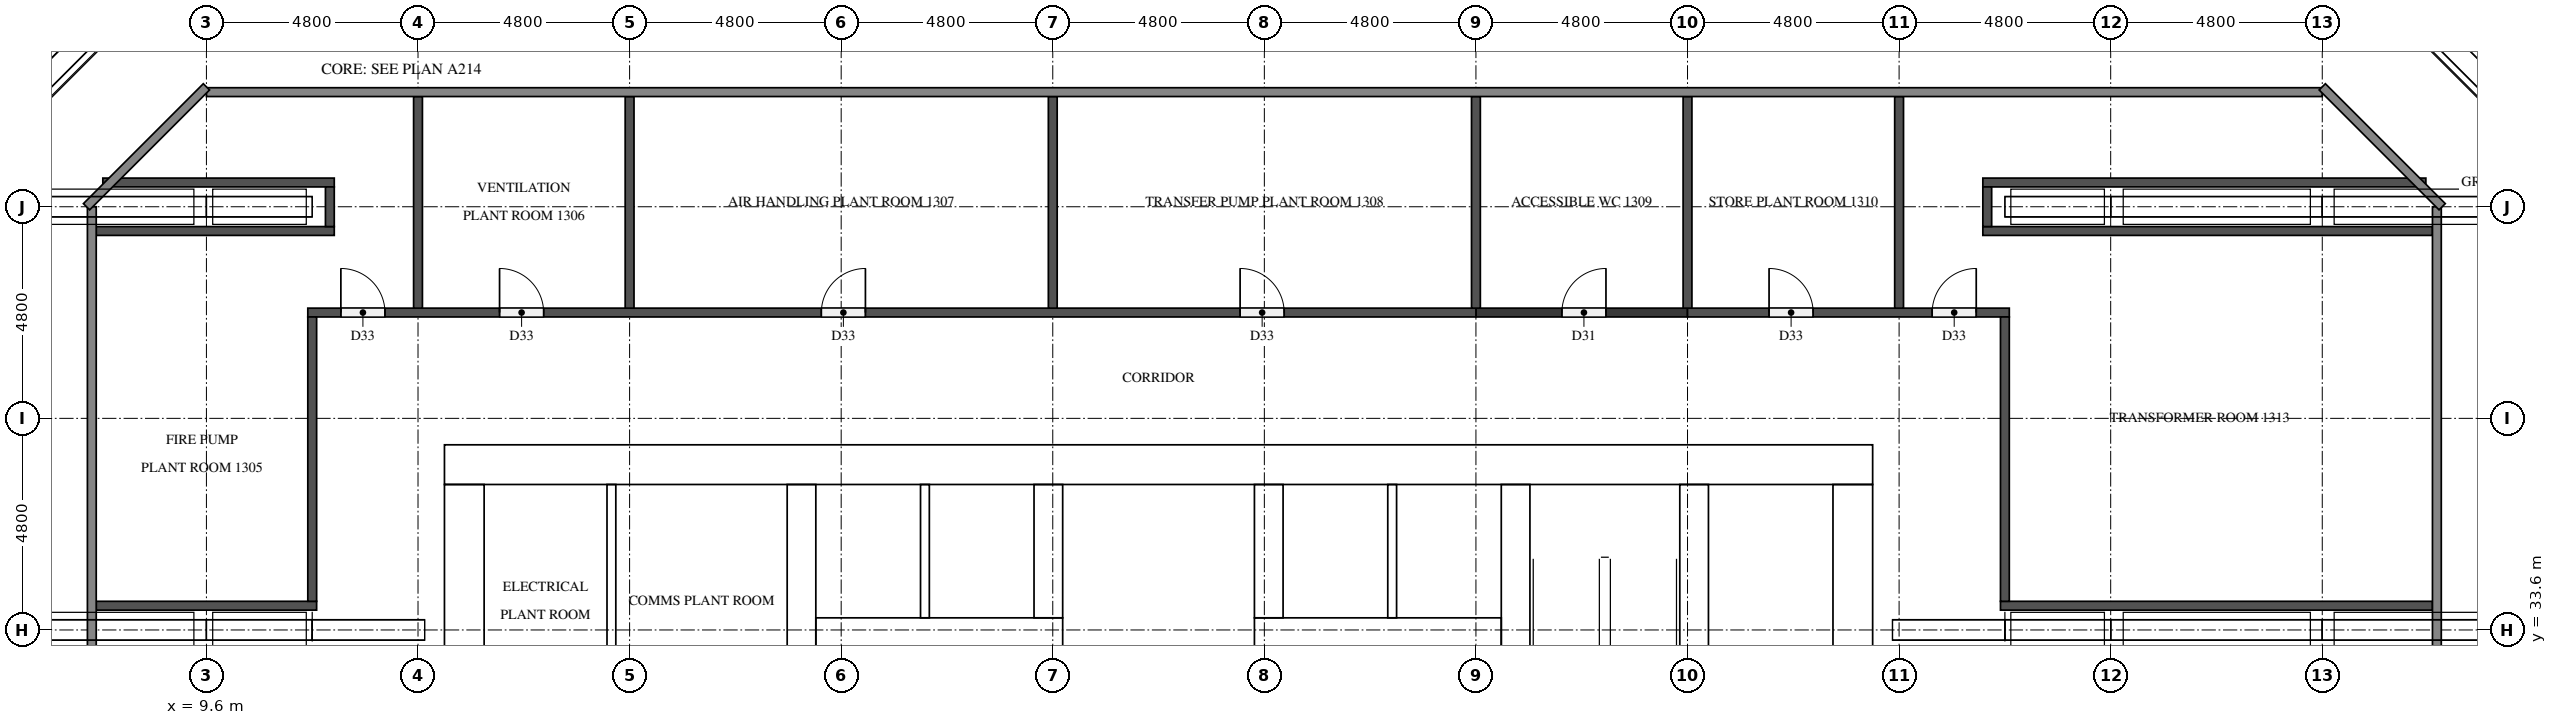
"""IFC4 building model, lengths in metres.
Left out: names, types, materials, properties, quantities, classifications, styles, units other than length and angle.
Written with IfcOpenShell. Run it as: python <this file> out.ifc"""

import sys

from ifc_helpers import new_model, si_unit, direction, frame, frame_2d, origin, place, context, subcontext, project, spatial, rectangle, extrude, element, fill, save


model = new_model("IFC4")
c1 = context("Model", 3, precision=1e-05, world=origin(), true_north=direction((0.0, 1.0)))
c2 = subcontext(c1, "Body", "Model", "MODEL_VIEW")
j1 = project(units=[si_unit("LENGTHUNIT", "METRE"), si_unit("PLANEANGLEUNIT", "RADIAN")], contexts=[c1])
p1 = place(None, origin())
s1 = spatial("IfcSite", under=j1, at=p1, CompositionType="ELEMENT")
p2 = place(p1, origin())
s2 = spatial("IfcBuilding", under=s1, at=p2, CompositionType="ELEMENT")
p3 = place(p2, frame((0.0, 0.0, 53.9)))
s3 = spatial("IfcBuildingStorey", under=s2, at=p3, CompositionType="ELEMENT", Elevation=53.9)
p4 = place(p3, frame((15.0, 37.35, 0.0), z_axis=(0.0, 0.0, 1.0), x_axis=(1.0, 0.0, 0.0)))
e1 = element("IfcWall", 1, at=p4, inside=s3, PredefinedType="SHEAR", context=c2, shape_type="SweptSolid", body=[
    extrude(rectangle(XDim=32.4, YDim=0.9, at=frame_2d((16.2, 0.0))), origin(), (0.0, 0.0, 1.0), 5.1),
])
p5 = place(p4, frame((15.3, 0.0, 0.0)))
e2 = element("IfcOpeningElement", 2, at=p5, cuts=e1, PredefinedType="OPENING", context=c2, shape_type="SweptSolid", body=[
    extrude(rectangle(XDim=1.8, YDim=2.1, at=frame_2d((0.9, 1.05))), frame((0.0, 0.46, 0.0), z_axis=(0.0, -1.0, 0.0), x_axis=(1.0, 0.0, 0.0)), (0.0, 0.0, 1.0), 0.92),
])
p6 = place(p4, frame((1.794, 0.0, 0.0)))
e3 = element("IfcOpeningElement", 3, at=p6, cuts=e1, PredefinedType="OPENING", context=c2, shape_type="SweptSolid", body=[
    extrude(rectangle(XDim=1.0, YDim=2.1, at=frame_2d((0.5, 1.05))), frame((0.0, 0.46, 0.0), z_axis=(0.0, -1.0, 0.0), x_axis=(1.0, 0.0, 0.0)), (0.0, 0.0, 1.0), 0.92),
])
p7 = place(p4, frame((5.331, 0.0, 0.0)))
e4 = element("IfcOpeningElement", 4, at=p7, cuts=e1, PredefinedType="OPENING", context=c2, shape_type="SweptSolid", body=[
    extrude(rectangle(XDim=1.0, YDim=2.1, at=frame_2d((0.5, 1.05))), frame((0.0, 0.46, 0.0), z_axis=(0.0, -1.0, 0.0), x_axis=(1.0, 0.0, 0.0)), (0.0, 0.0, 1.0), 0.92),
])
p8 = place(p3, frame((15.45, 15.9, 0.0), z_axis=(0.0, 0.0, 1.0), x_axis=(0.0, 1.0, 0.0)))
e5 = element("IfcWall", 5, at=p8, inside=s3, PredefinedType="SHEAR", context=c2, shape_type="SweptSolid", body=[
    extrude(rectangle(XDim=21.0, YDim=0.9, at=frame_2d((10.5, 0.0))), origin(), (0.0, 0.0, 1.0), 5.1),
])
p9 = place(p8, frame((4.86, 0.0, 0.0)))
e6 = element("IfcOpeningElement", 6, at=p9, cuts=e5, PredefinedType="OPENING", context=c2, shape_type="SweptSolid", body=[
    extrude(rectangle(XDim=1.2, YDim=2.1, at=frame_2d((0.6, 1.05))), frame((0.0, 0.46, 0.0), z_axis=(0.0, -1.0, 0.0), x_axis=(1.0, 0.0, 0.0)), (0.0, 0.0, 1.0), 0.92),
])
p10 = place(p3, frame((46.95, 15.9, 0.0), z_axis=(0.0, 0.0, 1.0), x_axis=(0.0, 1.0, 0.0)))
e7 = element("IfcWall", 7, at=p10, inside=s3, PredefinedType="SHEAR", context=c2, shape_type="SweptSolid", body=[
    extrude(rectangle(XDim=21.0, YDim=0.9, at=frame_2d((10.5, 0.0))), origin(), (0.0, 0.0, 1.0), 5.1),
])
p11 = place(p10, frame((10.2, 0.0, 0.0)))
e8 = element("IfcOpeningElement", 8, at=p11, cuts=e7, PredefinedType="OPENING", context=c2, shape_type="SweptSolid", body=[
    extrude(rectangle(XDim=1.2, YDim=2.1, at=frame_2d((0.6, 1.05))), frame((0.0, 0.46, 0.0), z_axis=(0.0, -1.0, 0.0), x_axis=(1.0, 0.0, 0.0)), (0.0, 0.0, 1.0), 0.92),
])
p12 = place(p3, frame((23.1, 15.9, 0.0), z_axis=(0.0, 0.0, 1.0), x_axis=(0.0, 1.0, 0.0)))
e9 = element("IfcWall", 9, at=p12, inside=s3, PredefinedType="SHEAR", context=c2, shape_type="SweptSolid", body=[
    extrude(rectangle(XDim=21.0, YDim=0.65, at=frame_2d((10.5, 0.0))), origin(), (0.0, 0.0, 1.0), 5.1),
])
p13 = place(p3, frame((39.3, 27.75, 0.0), z_axis=(0.0, 0.0, 1.0), x_axis=(0.0, 1.0, 0.0)))
e10 = element("IfcWall", 10, at=p13, inside=s3, PredefinedType="SHEAR", context=c2, shape_type="SweptSolid", body=[
    extrude(rectangle(XDim=9.15, YDim=0.65, at=frame_2d((4.575, 0.0))), origin(), (0.0, 0.0, 1.0), 5.1),
])
p14 = place(p3, frame((43.35, 27.75, 0.0), z_axis=(0.0, 0.0, 1.0), x_axis=(0.0, 1.0, 0.0)))
e11 = element("IfcWall", 11, at=p14, inside=s3, PredefinedType="SHEAR", context=c2, shape_type="SweptSolid", body=[
    extrude(rectangle(XDim=9.15, YDim=0.65, at=frame_2d((4.575, 0.0))), origin(), (0.0, 0.0, 1.0), 5.1),
])
p15 = place(p14, frame((7.65, 0.0, 0.0)))
e12 = element("IfcOpeningElement", 12, at=p15, cuts=e11, PredefinedType="OPENING", context=c2, shape_type="SweptSolid", body=[
    extrude(rectangle(XDim=1.2, YDim=2.1, at=frame_2d((0.6, 1.05))), frame((0.0, 0.335, 0.0), z_axis=(0.0, -1.0, 0.0), x_axis=(1.0, 0.0, 0.0)), (0.0, 0.0, 1.0), 0.67),
])
p16 = place(p3, frame((23.425, 33.55, 0.0), z_axis=(0.0, 0.0, 1.0), x_axis=(1.0, 0.0, 0.0)))
e13 = element("IfcWall", 13, at=p16, inside=s3, PredefinedType="SHEAR", context=c2, shape_type="SweptSolid", body=[
    extrude(rectangle(XDim=5.6, YDim=0.65, at=frame_2d((2.8, 0.0))), origin(), (0.0, 0.0, 1.0), 5.1),
])
p17 = place(p3, frame((33.375, 33.55, 0.0), z_axis=(0.0, 0.0, 1.0), x_axis=(1.0, 0.0, 0.0)))
e14 = element("IfcWall", 14, at=p17, inside=s3, PredefinedType="SHEAR", context=c2, shape_type="SweptSolid", body=[
    extrude(rectangle(XDim=5.6, YDim=0.65, at=frame_2d((2.8, 0.0))), origin(), (0.0, 0.0, 1.0), 5.1),
])
for number, where, z_axis, x_axis in (
    (15, (28.7, 33.875, 0.0), (0.0, 0.0, 1.0), (0.0, 1.0, 0.0)),
    (16, (33.7, 33.875, 0.0), (0.0, 0.0, 1.0), (0.0, 1.0, 0.0)),
):
    element("IfcWall", number, at=place(p3, frame(where, z_axis=z_axis, x_axis=x_axis)), inside=s3, PredefinedType="SHEAR", context=c2, shape_type="SweptSolid", body=[
        extrude(rectangle(XDim=3.025, YDim=0.65, at=frame_2d((1.512, 0.0))), origin(), (0.0, 0.0, 1.0), 5.1),
    ])
for number, where, z_axis, x_axis in (
    (17, (25.9, 33.875, 0.0), (0.0, 0.0, 1.0), (0.0, 1.0, 0.0)),
    (18, (36.5, 33.875, 0.0), (0.0, 0.0, 1.0), (0.0, 1.0, 0.0)),
):
    element("IfcWall", number, at=place(p3, frame(where, z_axis=z_axis, x_axis=x_axis)), inside=s3, PredefinedType="SOLIDWALL", context=c2, shape_type="SweptSolid", body=[
        extrude(rectangle(XDim=3.025, YDim=0.2, at=frame_2d((1.512, 0.0))), origin(), (0.0, 0.0, 1.0), 5.1),
    ])
p18 = place(p3, frame((18.788, 31.575, 0.0), z_axis=(0.0, 0.0, 1.0), x_axis=(0.0, 1.0, 0.0)))
e19 = element("IfcWall", 19, at=p18, inside=s3, PredefinedType="PARTITIONING", context=c2, shape_type="SweptSolid", body=[
    extrude(rectangle(XDim=5.325, YDim=0.2, at=frame_2d((2.663, 0.0))), origin(), (0.0, 0.0, 1.0), 5.1),
])
p19 = place(p3, frame((7.1, 34.15, 0.0), z_axis=(0.0, 0.0, 1.0), x_axis=(1.0, 0.0, 0.0)))
e20 = element("IfcWall", 20, at=p19, inside=s3, PredefinedType="PARTITIONING", context=c2, shape_type="SweptSolid", body=[
    extrude(rectangle(XDim=5.0, YDim=0.2, at=frame_2d((2.5, 0.0))), origin(), (0.0, 0.0, 1.0), 5.1),
])
p20 = place(p3, frame((50.3, 34.15, 0.0), z_axis=(0.0, 0.0, 1.0), x_axis=(1.0, 0.0, 0.0)))
e21 = element("IfcWall", 21, at=p20, inside=s3, PredefinedType="PARTITIONING", context=c2, shape_type="SweptSolid", body=[
    extrude(rectangle(XDim=9.8, YDim=0.2, at=frame_2d((4.9, 0.0))), origin(), (0.0, 0.0, 1.0), 5.1),
])
p21 = place(p3, frame((38.4, 40.8, 0.0), z_axis=(0.0, 0.0, 1.0), x_axis=(1.0, 0.0, 0.0)))
e22 = element("IfcWall", 22, at=p21, inside=s3, PredefinedType="PARTITIONING", context=c2, shape_type="SweptSolid", body=[
    extrude(rectangle(XDim=4.8, YDim=0.2, at=frame_2d((2.4, 0.0))), origin(), (0.0, 0.0, 1.0), 5.1),
])
p22 = place(p21, frame((1.95, 0.0, 0.0)))
e23 = element("IfcOpeningElement", 23, at=p22, cuts=e22, PredefinedType="OPENING", context=c2, shape_type="SweptSolid", body=[
    extrude(rectangle(XDim=1.0, YDim=2.1, at=frame_2d((0.5, 1.05))), frame((0.0, 0.11, 0.0), z_axis=(0.0, -1.0, 0.0), x_axis=(1.0, 0.0, 0.0)), (0.0, 0.0, 1.0), 0.22),
])
p23 = place(p3, frame((11.9, 40.8, 0.0), z_axis=(0.0, 0.0, 1.0), x_axis=(1.0, 0.0, 0.0)))
e24 = element("IfcWall", 24, at=p23, inside=s3, PredefinedType="PARTITIONING", context=c2, shape_type="SweptSolid", body=[
    extrude(rectangle(XDim=26.5, YDim=0.2, at=frame_2d((13.25, 0.0))), origin(), (0.0, 0.0, 1.0), 5.1),
])
p24 = place(p23, frame((0.75, 0.0, 0.0)))
e25 = element("IfcOpeningElement", 25, at=p24, cuts=e24, PredefinedType="OPENING", context=c2, shape_type="SweptSolid", body=[
    extrude(rectangle(XDim=1.0, YDim=2.1, at=frame_2d((0.5, 1.05))), frame((0.0, 0.11, 0.0), z_axis=(0.0, -1.0, 0.0), x_axis=(1.0, 0.0, 0.0)), (0.0, 0.0, 1.0), 0.22),
])
p25 = place(p23, frame((4.35, 0.0, 0.0)))
e26 = element("IfcOpeningElement", 26, at=p25, cuts=e24, PredefinedType="OPENING", context=c2, shape_type="SweptSolid", body=[
    extrude(rectangle(XDim=1.0, YDim=2.1, at=frame_2d((0.5, 1.05))), frame((0.0, 0.11, 0.0), z_axis=(0.0, -1.0, 0.0), x_axis=(1.0, 0.0, 0.0)), (0.0, 0.0, 1.0), 0.22),
])
p26 = place(p23, frame((11.65, 0.0, 0.0)))
e27 = element("IfcOpeningElement", 27, at=p26, cuts=e24, PredefinedType="OPENING", context=c2, shape_type="SweptSolid", body=[
    extrude(rectangle(XDim=1.0, YDim=2.1, at=frame_2d((0.5, 1.05))), frame((0.0, 0.11, 0.0), z_axis=(0.0, -1.0, 0.0), x_axis=(1.0, 0.0, 0.0)), (0.0, 0.0, 1.0), 0.22),
])
p27 = place(p23, frame((21.15, 0.0, 0.0)))
e28 = element("IfcOpeningElement", 28, at=p27, cuts=e24, PredefinedType="OPENING", context=c2, shape_type="SweptSolid", body=[
    extrude(rectangle(XDim=1.0, YDim=2.1, at=frame_2d((0.5, 1.05))), frame((0.0, 0.11, 0.0), z_axis=(0.0, -1.0, 0.0), x_axis=(1.0, 0.0, 0.0)), (0.0, 0.0, 1.0), 0.22),
])
p28 = place(p3, frame((43.2, 40.8, 0.0), z_axis=(0.0, 0.0, 1.0), x_axis=(1.0, 0.0, 0.0)))
e29 = element("IfcWall", 29, at=p28, inside=s3, PredefinedType="PARTITIONING", context=c2, shape_type="SweptSolid", body=[
    extrude(rectangle(XDim=7.3, YDim=0.2, at=frame_2d((3.65, 0.0))), origin(), (0.0, 0.0, 1.0), 5.1),
])
p29 = place(p28, frame((1.85, 0.0, 0.0)))
e30 = element("IfcOpeningElement", 30, at=p29, cuts=e29, PredefinedType="OPENING", context=c2, shape_type="SweptSolid", body=[
    extrude(rectangle(XDim=1.0, YDim=2.1, at=frame_2d((0.5, 1.05))), frame((0.0, 0.11, 0.0), z_axis=(0.0, -1.0, 0.0), x_axis=(1.0, 0.0, 0.0)), (0.0, 0.0, 1.0), 0.22),
])
p30 = place(p28, frame((5.55, 0.0, 0.0)))
e31 = element("IfcOpeningElement", 31, at=p30, cuts=e29, PredefinedType="OPENING", context=c2, shape_type="SweptSolid", body=[
    extrude(rectangle(XDim=1.0, YDim=2.1, at=frame_2d((0.5, 1.05))), frame((0.0, 0.11, 0.0), z_axis=(0.0, -1.0, 0.0), x_axis=(1.0, 0.0, 0.0)), (0.0, 0.0, 1.0), 0.22),
])
p31 = place(p3, frame((7.1, 42.65, 0.0), z_axis=(0.0, 0.0, 1.0), x_axis=(1.0, 0.0, 0.0)))
e32 = element("IfcWall", 32, at=p31, inside=s3, PredefinedType="PARTITIONING", context=c2, shape_type="SweptSolid", body=[
    extrude(rectangle(XDim=5.4, YDim=0.2, at=frame_2d((2.7, 0.0))), origin(), (0.0, 0.0, 1.0), 5.1),
])
p32 = place(p3, frame((49.9, 42.65, 0.0), z_axis=(0.0, 0.0, 1.0), x_axis=(1.0, 0.0, 0.0)))
e33 = element("IfcWall", 33, at=p32, inside=s3, PredefinedType="PARTITIONING", context=c2, shape_type="SweptSolid", body=[
    extrude(rectangle(XDim=10.2, YDim=0.2, at=frame_2d((5.1, 0.0))), origin(), (0.0, 0.0, 1.0), 5.1),
])
p33 = place(p3, frame((7.25, 43.75, 0.0), z_axis=(0.0, 0.0, 1.0), x_axis=(1.0, 0.0, 0.0)))
e34 = element("IfcWall", 34, at=p33, inside=s3, PredefinedType="PARTITIONING", context=c2, shape_type="SweptSolid", body=[
    extrude(rectangle(XDim=5.25, YDim=0.2, at=frame_2d((2.625, 0.0))), origin(), (0.0, 0.0, 1.0), 5.1),
])
p34 = place(p3, frame((49.9, 43.75, 0.0), z_axis=(0.0, 0.0, 1.0), x_axis=(1.0, 0.0, 0.0)))
e35 = element("IfcWall", 35, at=p34, inside=s3, PredefinedType="PARTITIONING", context=c2, shape_type="SweptSolid", body=[
    extrude(rectangle(XDim=10.05, YDim=0.2, at=frame_2d((5.025, 0.0))), origin(), (0.0, 0.0, 1.0), 5.1),
])
p35 = place(p3, frame((12.0, 34.25, 0.0), z_axis=(0.0, 0.0, 1.0), x_axis=(0.0, 1.0, 0.0)))
e36 = element("IfcWall", 36, at=p35, inside=s3, PredefinedType="PARTITIONING", context=c2, shape_type="SweptSolid", body=[
    extrude(rectangle(XDim=6.45, YDim=0.2, at=frame_2d((3.225, 0.0))), origin(), (0.0, 0.0, 1.0), 5.1),
])
p36 = place(p3, frame((12.4, 42.75, 0.0), z_axis=(0.0, 0.0, 1.0), x_axis=(0.0, 1.0, 0.0)))
e37 = element("IfcWall", 37, at=p36, inside=s3, PredefinedType="PARTITIONING", context=c2, shape_type="SweptSolid", body=[
    extrude(rectangle(XDim=0.9, YDim=0.2, at=frame_2d((0.45, 0.0))), origin(), (0.0, 0.0, 1.0), 5.1),
])
for number, where, z_axis, x_axis in (
    (38, (14.4, 40.9, 0.0), (0.0, 0.0, 1.0), (0.0, 1.0, 0.0)),
    (39, (19.2, 40.9, 0.0), (0.0, 0.0, 1.0), (0.0, 1.0, 0.0)),
    (40, (28.8, 40.9, 0.0), (0.0, 0.0, 1.0), (0.0, 1.0, 0.0)),
    (41, (38.4, 40.9, 0.0), (0.0, 0.0, 1.0), (0.0, 1.0, 0.0)),
    (42, (43.2, 40.9, 0.0), (0.0, 0.0, 1.0), (0.0, 1.0, 0.0)),
    (43, (48.0, 40.9, 0.0), (0.0, 0.0, 1.0), (0.0, 1.0, 0.0)),
):
    element("IfcWall", number, at=place(p3, frame(where, z_axis=z_axis, x_axis=x_axis)), inside=s3, PredefinedType="PARTITIONING", context=c2, shape_type="SweptSolid", body=[
        extrude(rectangle(XDim=4.8, YDim=0.2, at=frame_2d((2.4, 0.0))), origin(), (0.0, 0.0, 1.0), 5.1),
    ])
p37 = place(p3, frame((50.0, 42.75, 0.0), z_axis=(0.0, 0.0, 1.0), x_axis=(0.0, 1.0, 0.0)))
e44 = element("IfcWall", 44, at=p37, inside=s3, PredefinedType="PARTITIONING", context=c2, shape_type="SweptSolid", body=[
    extrude(rectangle(XDim=0.9, YDim=0.2, at=frame_2d((0.45, 0.0))), origin(), (0.0, 0.0, 1.0), 5.1),
])
p38 = place(p3, frame((50.4, 34.25, 0.0), z_axis=(0.0, 0.0, 1.0), x_axis=(0.0, 1.0, 0.0)))
e45 = element("IfcWall", 45, at=p38, inside=s3, PredefinedType="PARTITIONING", context=c2, shape_type="SweptSolid", body=[
    extrude(rectangle(XDim=6.45, YDim=0.2, at=frame_2d((3.225, 0.0))), origin(), (0.0, 0.0, 1.0), 5.1),
])
p39 = place(p15, origin())
e46 = element("IfcDoor", 46, at=p39, inside=s3, OperationType="SINGLE_SWING_LEFT", PredefinedType="DOOR", context=c2, shape_type="SweptSolid", body=[
    extrude(rectangle(XDim=1.2, YDim=2.1, at=frame_2d((0.6, 1.05))), frame((0.0, 0.025, 0.0), z_axis=(0.0, -1.0, 0.0), x_axis=(1.0, 0.0, 0.0)), (0.0, 0.0, 1.0), 0.05),
])
fill(e12, e46)
p40 = place(p5, origin())
e47 = element("IfcDoor", 47, at=p40, inside=s3, OperationType="DOUBLE_DOOR_SINGLE_SWING", PredefinedType="DOOR", context=c2, shape_type="SweptSolid", body=[
    extrude(rectangle(XDim=1.8, YDim=2.1, at=frame_2d((0.9, 1.05))), frame((0.0, 0.025, 0.0), z_axis=(0.0, -1.0, 0.0), x_axis=(1.0, 0.0, 0.0)), (0.0, 0.0, 1.0), 0.05),
])
fill(e2, e47)
p41 = place(p6, origin())
e48 = element("IfcDoor", 48, at=p41, inside=s3, OperationType="SINGLE_SWING_RIGHT", PredefinedType="DOOR", context=c2, shape_type="SweptSolid", body=[
    extrude(rectangle(XDim=1.0, YDim=2.1, at=frame_2d((0.5, 1.05))), frame((0.0, 0.025, 0.0), z_axis=(0.0, -1.0, 0.0), x_axis=(1.0, 0.0, 0.0)), (0.0, 0.0, 1.0), 0.05),
])
fill(e3, e48)
p42 = place(p7, origin())
e49 = element("IfcDoor", 49, at=p42, inside=s3, OperationType="SINGLE_SWING_LEFT", PredefinedType="DOOR", context=c2, shape_type="SweptSolid", body=[
    extrude(rectangle(XDim=1.0, YDim=2.1, at=frame_2d((0.5, 1.05))), frame((0.0, 0.025, 0.0), z_axis=(0.0, -1.0, 0.0), x_axis=(1.0, 0.0, 0.0)), (0.0, 0.0, 1.0), 0.05),
])
fill(e4, e49)
p43 = place(p24, origin())
e50 = element("IfcDoor", 50, at=p43, inside=s3, OperationType="SINGLE_SWING_LEFT", PredefinedType="DOOR", context=c2, shape_type="SweptSolid", body=[
    extrude(rectangle(XDim=1.0, YDim=2.1, at=frame_2d((0.5, 1.05))), frame((0.0, 0.025, 0.0), z_axis=(0.0, -1.0, 0.0), x_axis=(1.0, 0.0, 0.0)), (0.0, 0.0, 1.0), 0.05),
])
fill(e25, e50)
p44 = place(p25, origin())
e51 = element("IfcDoor", 51, at=p44, inside=s3, OperationType="SINGLE_SWING_LEFT", PredefinedType="DOOR", context=c2, shape_type="SweptSolid", body=[
    extrude(rectangle(XDim=1.0, YDim=2.1, at=frame_2d((0.5, 1.05))), frame((0.0, 0.025, 0.0), z_axis=(0.0, -1.0, 0.0), x_axis=(1.0, 0.0, 0.0)), (0.0, 0.0, 1.0), 0.05),
])
fill(e26, e51)
p45 = place(p26, origin())
e52 = element("IfcDoor", 52, at=p45, inside=s3, OperationType="SINGLE_SWING_RIGHT", PredefinedType="DOOR", context=c2, shape_type="SweptSolid", body=[
    extrude(rectangle(XDim=1.0, YDim=2.1, at=frame_2d((0.5, 1.05))), frame((0.0, 0.025, 0.0), z_axis=(0.0, -1.0, 0.0), x_axis=(1.0, 0.0, 0.0)), (0.0, 0.0, 1.0), 0.05),
])
fill(e27, e52)
p46 = place(p27, origin())
e53 = element("IfcDoor", 53, at=p46, inside=s3, OperationType="SINGLE_SWING_LEFT", PredefinedType="DOOR", context=c2, shape_type="SweptSolid", body=[
    extrude(rectangle(XDim=1.0, YDim=2.1, at=frame_2d((0.5, 1.05))), frame((0.0, 0.025, 0.0), z_axis=(0.0, -1.0, 0.0), x_axis=(1.0, 0.0, 0.0)), (0.0, 0.0, 1.0), 0.05),
])
fill(e28, e53)
p47 = place(p22, origin())
e54 = element("IfcDoor", 54, at=p47, inside=s3, OperationType="SINGLE_SWING_RIGHT", PredefinedType="DOOR", context=c2, shape_type="SweptSolid", body=[
    extrude(rectangle(XDim=1.0, YDim=2.1, at=frame_2d((0.5, 1.05))), frame((0.0, 0.025, 0.0), z_axis=(0.0, -1.0, 0.0), x_axis=(1.0, 0.0, 0.0)), (0.0, 0.0, 1.0), 0.05),
])
fill(e23, e54)
p48 = place(p29, origin())
e55 = element("IfcDoor", 55, at=p48, inside=s3, OperationType="SINGLE_SWING_LEFT", PredefinedType="DOOR", context=c2, shape_type="SweptSolid", body=[
    extrude(rectangle(XDim=1.0, YDim=2.1, at=frame_2d((0.5, 1.05))), frame((0.0, 0.025, 0.0), z_axis=(0.0, -1.0, 0.0), x_axis=(1.0, 0.0, 0.0)), (0.0, 0.0, 1.0), 0.05),
])
fill(e30, e55)
p49 = place(p30, origin())
e56 = element("IfcDoor", 56, at=p49, inside=s3, OperationType="SINGLE_SWING_RIGHT", PredefinedType="DOOR", context=c2, shape_type="SweptSolid", body=[
    extrude(rectangle(XDim=1.0, YDim=2.1, at=frame_2d((0.5, 1.05))), frame((0.0, 0.025, 0.0), z_axis=(0.0, -1.0, 0.0), x_axis=(1.0, 0.0, 0.0)), (0.0, 0.0, 1.0), 0.05),
])
fill(e31, e56)
save(model, sys.argv[1])
